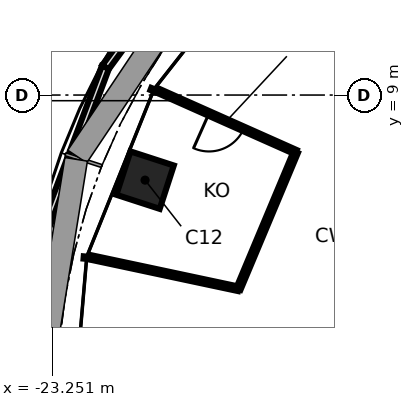
"""IFC4 building model, lengths in metres.
Left out: names, types, materials, properties, quantities, classifications, styles, units other than length and angle.
Written with IfcOpenShell. Run it as: python <this file> out.ifc"""

import sys

from ifc_helpers import new_model, si_unit, direction, frame, frame_2d, origin, origin_2d, place, context, subcontext, project, spatial, rectangle, extrude, element, fill, save


model = new_model("IFC4")
c1 = context("Model", 3, precision=1e-05, world=origin(), true_north=direction((0.0, 1.0)))
c2 = subcontext(c1, "Body", "Model", "MODEL_VIEW")
j1 = project(units=[si_unit("LENGTHUNIT", "METRE"), si_unit("PLANEANGLEUNIT", "RADIAN")], contexts=[c1])
p1 = place(None, origin())
s1 = spatial("IfcSite", under=j1, at=p1, CompositionType="ELEMENT")
p2 = place(p1, origin())
s2 = spatial("IfcBuilding", under=s1, at=p2, CompositionType="ELEMENT")
p3 = place(p2, frame((0.0, 0.0, 251.8)))
s3 = spatial("IfcBuildingStorey", under=s2, at=p3, CompositionType="ELEMENT", Elevation=251.8)
p4 = place(p3, frame((-20.808, 6.761, 0.0), z_axis=(0.0, 0.0, 1.0), x_axis=(-0.951056516295, 0.309016994375, 0.0)))
e1 = element("IfcColumn", 1, at=p4, inside=s3, PredefinedType="COLUMN", context=c2, shape_type="SweptSolid", body=[
    extrude(rectangle(XDim=1.2, YDim=1.2, at=origin_2d()), origin(), (0.0, 0.0, 1.0), 4.2),
])
p5 = place(p3, frame((-18.913, 13.741, 0.0), z_axis=(0.0, 0.0, 1.0), x_axis=(-0.591095479089, -0.806601595957, 0.0)))
e2 = element("IfcWall", 2, at=p5, inside=s3, PredefinedType="PARAPET", context=c2, shape_type="SweptSolid", body=[
    extrude(rectangle(XDim=4.973, YDim=0.2, at=frame_2d((2.487, 0.0))), origin(), (0.0, 0.0, 1.0), 1.1),
])
p6 = place(p3, frame((-21.852, 9.729, 0.0), z_axis=(0.0, 0.0, 1.0), x_axis=(-0.351538338132, -0.936173486499, 0.0)))
e3 = element("IfcWall", 3, at=p6, inside=s3, PredefinedType="PARAPET", context=c2, shape_type="SweptSolid", body=[
    extrude(rectangle(XDim=5.03, YDim=0.2, at=frame_2d((2.515, 0.0))), origin(), (0.0, 0.0, 1.0), 1.1),
])
p7 = place(p3, frame((-16.842, 7.499, 0.0), z_axis=(0.0, 0.0, 1.0), x_axis=(-0.913549606868, 0.406727323635, 0.0)))
e4 = element("IfcWall", 4, at=p7, inside=s3, PredefinedType="PARTITIONING", context=c2, shape_type="SweptSolid", body=[
    extrude(rectangle(XDim=4.0, YDim=0.12, at=frame_2d((2.0, 0.0))), origin(), (0.0, 0.0, 1.0), 4.04),
])
p8 = place(p7, frame((1.5, 0.0, 0.0)))
e5 = element("IfcOpeningElement", 5, at=p8, cuts=e4, PredefinedType="OPENING", context=c2, shape_type="SweptSolid", body=[
    extrude(rectangle(XDim=1.0, YDim=2.4, at=frame_2d((0.5, 1.2))), frame((0.0, 0.07, 0.0), z_axis=(0.0, -1.0, 0.0), x_axis=(1.0, 0.0, 0.0)), (0.0, 0.0, 1.0), 0.14),
])
p9 = place(p3, frame((-18.351, 3.901, 0.0), z_axis=(0.0, 0.0, 1.0), x_axis=(0.38675585774, 0.922182143887, 0.0)))
e6 = element("IfcWall", 6, at=p9, inside=s3, PredefinedType="PARTITIONING", context=c2, shape_type="SweptSolid", body=[
    extrude(rectangle(XDim=3.902, YDim=0.12, at=frame_2d((1.951, 0.0))), origin(), (0.0, 0.0, 1.0), 4.04),
])
p10 = place(p3, frame((-22.264, 4.732, 0.0), z_axis=(0.0, 0.0, 1.0), x_axis=(0.978140543132, -0.207944891454, 0.0)))
e7 = element("IfcWall", 7, at=p10, inside=s3, PredefinedType="PARTITIONING", context=c2, shape_type="SweptSolid", body=[
    extrude(rectangle(XDim=4.0, YDim=0.12, at=frame_2d((2.0, 0.0))), origin(), (0.0, 0.0, 1.0), 4.04),
])
p11 = place(p8, origin())
e8 = element("IfcDoor", 8, at=p11, inside=s3, OperationType="SINGLE_SWING_RIGHT", PredefinedType="DOOR", context=c2, shape_type="SweptSolid", body=[
    extrude(rectangle(XDim=1.0, YDim=2.4, at=frame_2d((0.5, 1.2))), frame((0.0, 0.025, 0.0), z_axis=(0.0, -1.0, 0.0), x_axis=(1.0, 0.0, 0.0)), (0.0, 0.0, 1.0), 0.05),
])
fill(e5, e8)
save(model, sys.argv[1])
